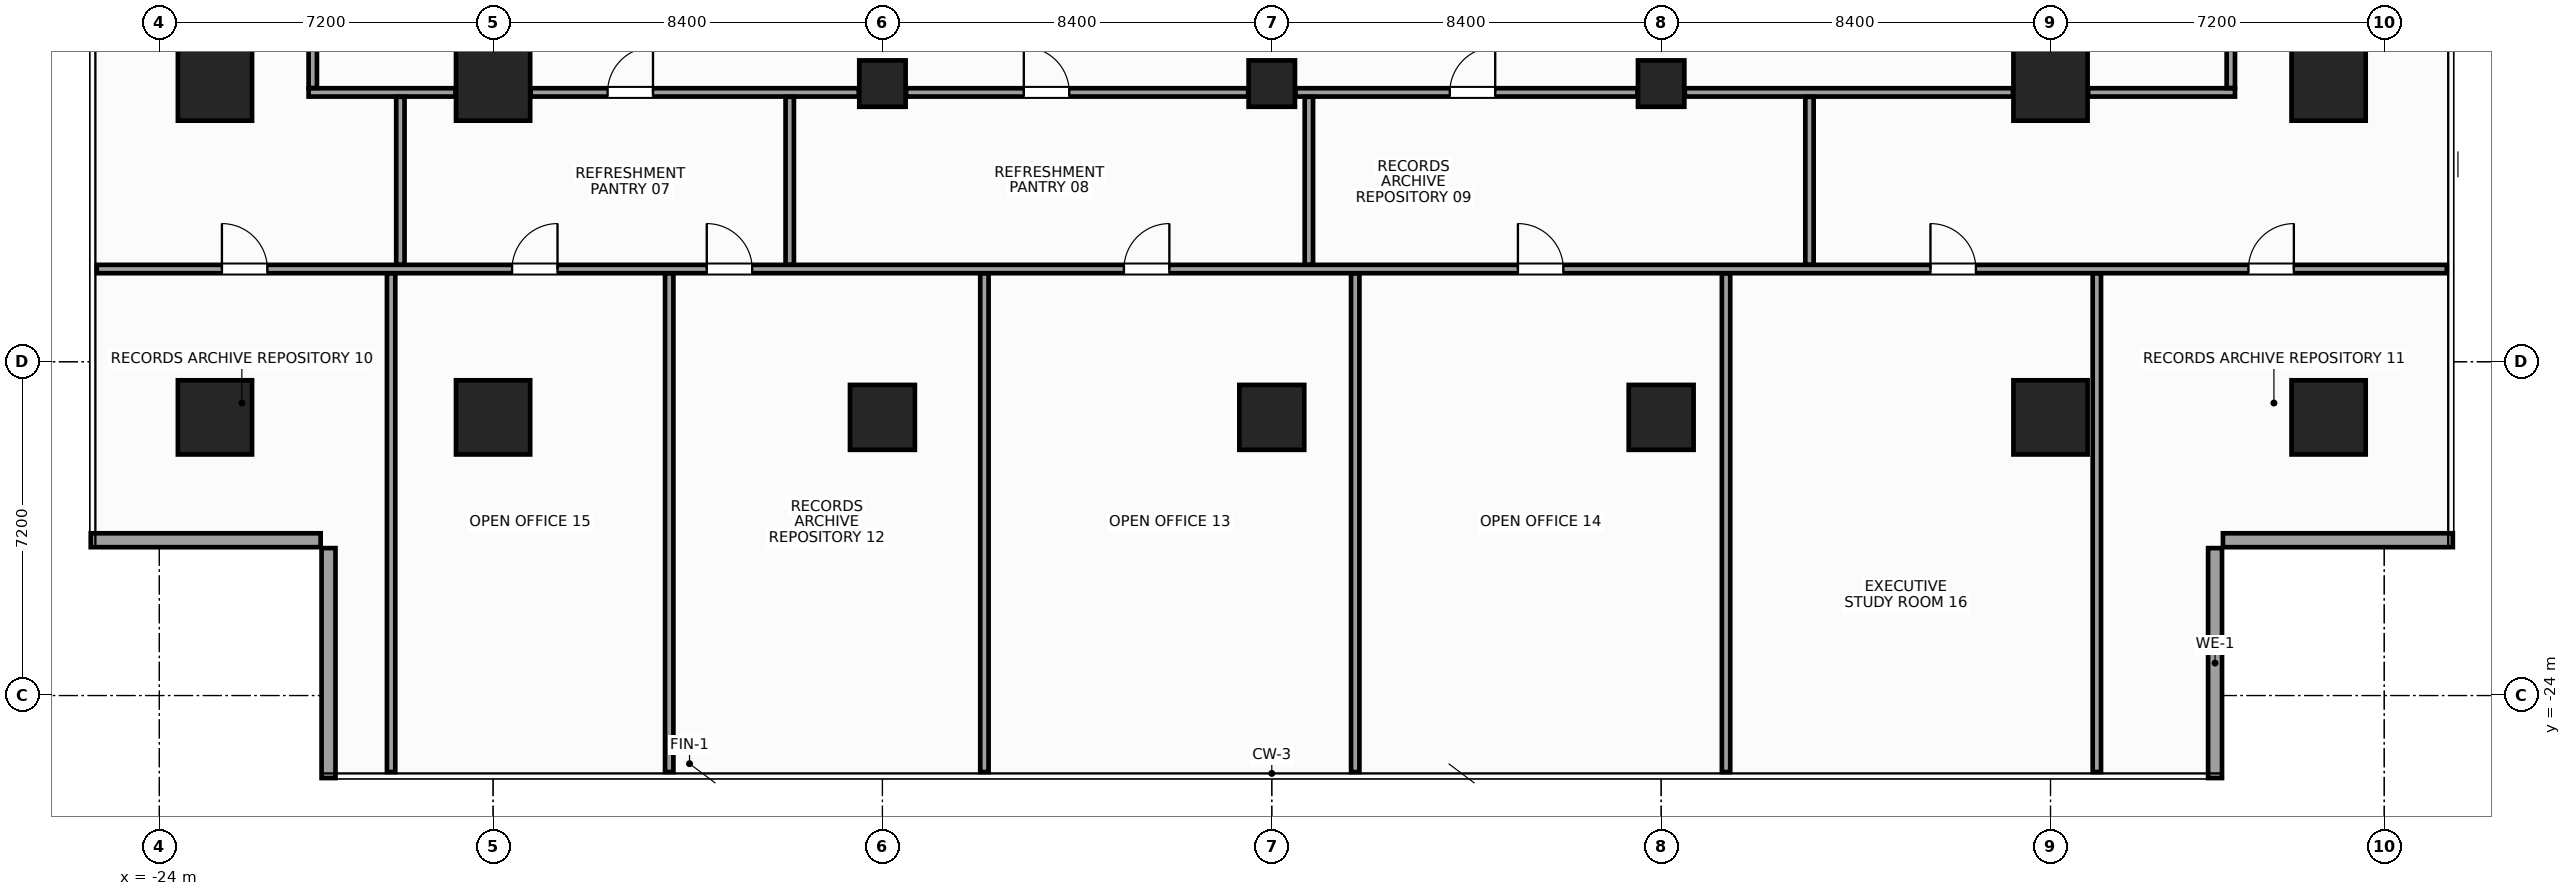
"""IFC4 building model, lengths in metres.
Left out: names, types, materials, properties, quantities, classifications, styles, units other than length and angle.
Written with IfcOpenShell. Run it as: python <this file> out.ifc"""

import sys

from ifc_helpers import new_model, si_unit, direction, frame, frame_2d, origin, origin_2d, place, context, subcontext, project, spatial, rectangle, hollow_rectangle, extrude, source, transform, mapped, element, fill, save


model = new_model("IFC4")
c1 = context("Model", 3, precision=1e-05, world=origin(), true_north=direction((0.0, 1.0)))
c2 = subcontext(c1, "Body", "Model", "MODEL_VIEW")
j1 = project(units=[si_unit("LENGTHUNIT", "METRE"), si_unit("PLANEANGLEUNIT", "RADIAN")], contexts=[c1])
p1 = place(None, origin())
s1 = spatial("IfcSite", under=j1, at=p1, CompositionType="ELEMENT")
p2 = place(p1, origin())
s2 = spatial("IfcBuilding", under=s1, at=p2, CompositionType="ELEMENT")
p3 = place(p2, frame((0.0, 0.0, 113.6)))
s3 = spatial("IfcBuildingStorey", under=s2, at=p3, CompositionType="ELEMENT", Elevation=113.6)
m1 = source(origin(), c2, "Body", "SweptSolid", [
    extrude(rectangle(XDim=1.6, YDim=1.6, at=origin_2d()), origin(), (0.0, 0.0, 1.0), 3.6),
])
for number, where, z_axis, x_axis in (
    (1, (-16.8, -18.0, 0.0), (0.0, 0.0, 1.0), (1.0, 0.0, 0.0)),
    (2, (-16.8, -10.8, 0.0), (0.0, 0.0, 1.0), (1.0, 0.0, 0.0)),
    (3, (16.8, -18.0, 0.0), (0.0, 0.0, 1.0), (1.0, 0.0, 0.0)),
    (4, (16.8, -10.8, 0.0), (0.0, 0.0, 1.0), (1.0, 0.0, 0.0)),
    (5, (-22.8, -18.0, 0.0), (0.0, 0.0, 1.0), (1.0, 0.0, 0.0)),
    (6, (-22.8, -10.8, 0.0), (0.0, 0.0, 1.0), (1.0, 0.0, 0.0)),
    (7, (22.8, -18.0, 0.0), (0.0, 0.0, 1.0), (1.0, 0.0, 0.0)),
    (8, (22.8, -10.8, 0.0), (0.0, 0.0, 1.0), (1.0, 0.0, 0.0)),
):
    element("IfcColumn", number, at=place(p3, frame(where, z_axis=z_axis, x_axis=x_axis)), inside=s3, PredefinedType="COLUMN", context=c2, shape_type="MappedRepresentation", body=[
        mapped(m1, transform((0.0, 0.0, 0.0), x_axis=(1.0, 0.0, 0.0), y_axis=(0.0, 1.0, 0.0), z_axis=(0.0, 0.0, 1.0), scale=1.0)),
    ])
m2 = source(origin(), c2, "Body", "SweptSolid", [
    extrude(rectangle(XDim=1.4, YDim=1.4, at=origin_2d()), origin(), (0.0, 0.0, 1.0), 3.6),
])
p4 = place(p3, frame((-8.4, -18.0, 0.0), z_axis=(0.0, 0.0, 1.0), x_axis=(1.0, 0.0, 0.0)))
e9 = element("IfcColumn", 9, at=p4, inside=s3, PredefinedType="COLUMN", context=c2, shape_type="MappedRepresentation", body=[
    mapped(m2, transform((0.0, 0.0, 0.0), x_axis=(1.0, 0.0, 0.0), y_axis=(0.0, 1.0, 0.0), z_axis=(0.0, 0.0, 1.0), scale=1.0)),
])
m3 = source(origin(), c2, "Body", "SweptSolid", [
    extrude(hollow_rectangle(XDim=1.0, YDim=1.0, WallThickness=0.045, at=origin_2d()), origin(), (0.0, 0.0, 1.0), 3.6),
])
p5 = place(p3, frame((-8.4, -10.8, 0.0), z_axis=(0.0, 0.0, 1.0), x_axis=(1.0, 0.0, 0.0)))
e10 = element("IfcColumn", 10, at=p5, inside=s3, PredefinedType="COLUMN", context=c2, shape_type="MappedRepresentation", body=[
    mapped(m3, transform((0.0, 0.0, 0.0), x_axis=(1.0, 0.0, 0.0), y_axis=(0.0, 1.0, 0.0), z_axis=(0.0, 0.0, 1.0), scale=1.0)),
])
p6 = place(p3, frame((8.4, -18.0, 0.0), z_axis=(0.0, 0.0, 1.0), x_axis=(1.0, 0.0, 0.0)))
e11 = element("IfcColumn", 11, at=p6, inside=s3, PredefinedType="COLUMN", context=c2, shape_type="MappedRepresentation", body=[
    mapped(m2, transform((0.0, 0.0, 0.0), x_axis=(1.0, 0.0, 0.0), y_axis=(0.0, 1.0, 0.0), z_axis=(0.0, 0.0, 1.0), scale=1.0)),
])
p7 = place(p3, frame((8.4, -10.8, 0.0), z_axis=(0.0, 0.0, 1.0), x_axis=(1.0, 0.0, 0.0)))
e12 = element("IfcColumn", 12, at=p7, inside=s3, PredefinedType="COLUMN", context=c2, shape_type="MappedRepresentation", body=[
    mapped(m3, transform((0.0, 0.0, 0.0), x_axis=(1.0, 0.0, 0.0), y_axis=(0.0, 1.0, 0.0), z_axis=(0.0, 0.0, 1.0), scale=1.0)),
])
p8 = place(p3, frame((0.0, -18.0, 0.0), z_axis=(0.0, 0.0, 1.0), x_axis=(1.0, 0.0, 0.0)))
e13 = element("IfcColumn", 13, at=p8, inside=s3, PredefinedType="COLUMN", context=c2, shape_type="MappedRepresentation", body=[
    mapped(m2, transform((0.0, 0.0, 0.0), x_axis=(1.0, 0.0, 0.0), y_axis=(0.0, 1.0, 0.0), z_axis=(0.0, 0.0, 1.0), scale=1.0)),
])
m4 = source(origin(), c2, "Body", "SweptSolid", [
    extrude(rectangle(XDim=1.0, YDim=1.0, at=origin_2d()), origin(), (0.0, 0.0, 1.0), 3.6),
])
p9 = place(p3, frame((0.0, -10.8, 0.0), z_axis=(0.0, 0.0, 1.0), x_axis=(1.0, 0.0, 0.0)))
e14 = element("IfcColumn", 14, at=p9, inside=s3, PredefinedType="COLUMN", context=c2, shape_type="MappedRepresentation", body=[
    mapped(m4, transform((0.0, 0.0, 0.0), x_axis=(1.0, 0.0, 0.0), y_axis=(0.0, 1.0, 0.0), z_axis=(0.0, 0.0, 1.0), scale=1.0)),
])
m5 = source(origin(), c2, "Body", "SweptSolid", [
    extrude(rectangle(XDim=4.96, YDim=0.3, at=frame_2d((2.48, 0.0))), origin(), (0.0, 0.0, 1.0), 2.74),
])
for number, where, z_axis, x_axis in (
    (15, (20.35, -25.78, 0.0), (0.0, 0.0, 1.0), (0.0, 1.0, 0.0)),
    (16, (20.52, -20.65, 0.0), (0.0, 0.0, 1.0), (1.0, 0.0, 0.0)),
    (17, (-25.48, -20.65, 0.0), (0.0, 0.0, 1.0), (1.0, 0.0, 0.0)),
    (18, (-20.35, -20.82, 0.0), (0.0, 0.0, 1.0), (0.0, -1.0, 0.0)),
):
    element("IfcWall", number, at=place(p3, frame(where, z_axis=z_axis, x_axis=x_axis)), inside=s3, PredefinedType="STANDARD", context=c2, shape_type="MappedRepresentation", body=[
        mapped(m5, transform((0.0, 0.0, 0.0), x_axis=(1.0, 0.0, 0.0), y_axis=(0.0, 1.0, 0.0), z_axis=(0.0, 0.0, 1.0), scale=1.0)),
    ])
m6 = source(origin(), c2, "Body", "SweptSolid", [
    extrude(rectangle(XDim=3.17, YDim=0.18, at=frame_2d((1.585, 0.0))), origin(), (0.0, 0.0, 1.0), 2.745),
])
p10 = place(p3, frame((-20.78, -10.99, 0.0), z_axis=(0.0, 0.0, 1.0), x_axis=(1.0, 0.0, 0.0)))
e19 = element("IfcWall", 19, at=p10, inside=s3, PredefinedType="PARTITIONING", context=c2, shape_type="MappedRepresentation", body=[
    mapped(m6, transform((0.0, 0.0, 0.0), x_axis=(1.0, 0.0, 0.0), y_axis=(0.0, 1.0, 0.0), z_axis=(0.0, 0.0, 1.0), scale=1.0)),
])
m7 = source(origin(), c2, "Body", "SweptSolid", [
    extrude(rectangle(XDim=7.08, YDim=0.18, at=frame_2d((3.54, 0.0))), origin(), (0.0, 0.0, 1.0), 2.745),
])
p11 = place(p3, frame((-15.99, -10.99, 0.0), z_axis=(0.0, 0.0, 1.0), x_axis=(1.0, 0.0, 0.0)))
e20 = element("IfcWall", 20, at=p11, inside=s3, PredefinedType="PARTITIONING", context=c2, shape_type="MappedRepresentation", body=[
    mapped(m7, transform((0.0, 0.0, 0.0), x_axis=(1.0, 0.0, 0.0), y_axis=(0.0, 1.0, 0.0), z_axis=(0.0, 0.0, 1.0), scale=1.0)),
])
p12 = place(p11, frame((1.66, 0.0, 0.0)))
e21 = element("IfcOpeningElement", 21, at=p12, cuts=e20, PredefinedType="OPENING", context=c2, shape_type="SweptSolid", body=[
    extrude(rectangle(XDim=0.98, YDim=2.15, at=frame_2d((0.49, 1.075))), frame((0.0, 0.102, 0.0), z_axis=(0.0, -1.0, 0.0), x_axis=(1.0, 0.0, 0.0)), (0.0, 0.0, 1.0), 0.204),
])
m8 = source(origin(), c2, "Body", "SweptSolid", [
    extrude(rectangle(XDim=7.38, YDim=0.18, at=frame_2d((3.69, 0.0))), origin(), (0.0, 0.0, 1.0), 2.745),
])
p13 = place(p3, frame((-7.89, -10.99, 0.0), z_axis=(0.0, 0.0, 1.0), x_axis=(1.0, 0.0, 0.0)))
e22 = element("IfcWall", 22, at=p13, inside=s3, PredefinedType="PARTITIONING", context=c2, shape_type="MappedRepresentation", body=[
    mapped(m8, transform((0.0, 0.0, 0.0), x_axis=(1.0, 0.0, 0.0), y_axis=(0.0, 1.0, 0.0), z_axis=(0.0, 0.0, 1.0), scale=1.0)),
])
p14 = place(p13, frame((2.54, 0.0, 0.0)))
e23 = element("IfcOpeningElement", 23, at=p14, cuts=e22, PredefinedType="OPENING", context=c2, shape_type="SweptSolid", body=[
    extrude(rectangle(XDim=0.98, YDim=2.15, at=frame_2d((0.49, 1.075))), frame((0.0, 0.102, 0.0), z_axis=(0.0, -1.0, 0.0), x_axis=(1.0, 0.0, 0.0)), (0.0, 0.0, 1.0), 0.204),
])
p15 = place(p3, frame((0.51, -10.99, 0.0), z_axis=(0.0, 0.0, 1.0), x_axis=(1.0, 0.0, 0.0)))
e24 = element("IfcWall", 24, at=p15, inside=s3, PredefinedType="PARTITIONING", context=c2, shape_type="MappedRepresentation", body=[
    mapped(m8, transform((0.0, 0.0, 0.0), x_axis=(1.0, 0.0, 0.0), y_axis=(0.0, 1.0, 0.0), z_axis=(0.0, 0.0, 1.0), scale=1.0)),
])
p16 = place(p15, frame((3.33, 0.0, 0.0)))
e25 = element("IfcOpeningElement", 25, at=p16, cuts=e24, PredefinedType="OPENING", context=c2, shape_type="SweptSolid", body=[
    extrude(rectangle(XDim=0.98, YDim=2.15, at=frame_2d((0.49, 1.075))), frame((0.0, 0.102, 0.0), z_axis=(0.0, -1.0, 0.0), x_axis=(1.0, 0.0, 0.0)), (0.0, 0.0, 1.0), 0.204),
])
p17 = place(p3, frame((8.91, -10.99, 0.0), z_axis=(0.0, 0.0, 1.0), x_axis=(1.0, 0.0, 0.0)))
e26 = element("IfcWall", 26, at=p17, inside=s3, PredefinedType="PARTITIONING", context=c2, shape_type="MappedRepresentation", body=[
    mapped(m7, transform((0.0, 0.0, 0.0), x_axis=(1.0, 0.0, 0.0), y_axis=(0.0, 1.0, 0.0), z_axis=(0.0, 0.0, 1.0), scale=1.0)),
])
p18 = place(p3, frame((17.61, -10.99, 0.0), z_axis=(0.0, 0.0, 1.0), x_axis=(1.0, 0.0, 0.0)))
e27 = element("IfcWall", 27, at=p18, inside=s3, PredefinedType="PARTITIONING", context=c2, shape_type="MappedRepresentation", body=[
    mapped(m6, transform((0.0, 0.0, 0.0), x_axis=(1.0, 0.0, 0.0), y_axis=(0.0, 1.0, 0.0), z_axis=(0.0, 0.0, 1.0), scale=1.0)),
])
m9 = source(origin(), c2, "Body", "SweptSolid", [
    extrude(rectangle(XDim=2.09, YDim=0.18, at=frame_2d((1.045, 0.0))), origin(), (0.0, 0.0, 1.0), 3.36),
])
for number, where, z_axis, x_axis in (
    (28, (-20.69, -10.895, 0.0), (0.0, 0.0, 1.0), (0.0, 1.0, 0.0)),
    (29, (20.69, -10.895, 0.0), (0.0, 0.0, 1.0), (0.0, 1.0, 0.0)),
):
    element("IfcWall", number, at=place(p3, frame(where, z_axis=z_axis, x_axis=x_axis)), inside=s3, PredefinedType="PARTITIONING", context=c2, shape_type="MappedRepresentation", body=[
        mapped(m9, transform((0.0, 0.0, 0.0), x_axis=(1.0, 0.0, 0.0), y_axis=(0.0, 1.0, 0.0), z_axis=(0.0, 0.0, 1.0), scale=1.0)),
    ])
m10 = source(origin(), c2, "Body", "SweptSolid", [
    extrude(rectangle(XDim=50.7, YDim=0.18, at=frame_2d((25.35, 0.0))), origin(), (0.0, 0.0, 1.0), 2.945),
])
p19 = place(p3, frame((-25.35, -14.8, 0.0), z_axis=(0.0, 0.0, 1.0), x_axis=(1.0, 0.0, 0.0)))
e30 = element("IfcWall", 30, at=p19, inside=s3, PredefinedType="PARTITIONING", context=c2, shape_type="MappedRepresentation", body=[
    mapped(m10, transform((0.0, 0.0, 0.0), x_axis=(1.0, 0.0, 0.0), y_axis=(0.0, 1.0, 0.0), z_axis=(0.0, 0.0, 1.0), scale=1.0)),
])
p20 = place(p19, frame((2.7, 0.0, 0.0)))
e31 = element("IfcOpeningElement", 31, at=p20, cuts=e30, PredefinedType="OPENING", context=c2, shape_type="SweptSolid", body=[
    extrude(rectangle(XDim=0.98, YDim=2.15, at=frame_2d((0.49, 1.075))), frame((0.0, 0.102, 0.0), z_axis=(0.0, -1.0, 0.0), x_axis=(1.0, 0.0, 0.0)), (0.0, 0.0, 1.0), 0.204),
])
p21 = place(p19, frame((46.42, 0.0, 0.0)))
e32 = element("IfcOpeningElement", 32, at=p21, cuts=e30, PredefinedType="OPENING", context=c2, shape_type="SweptSolid", body=[
    extrude(rectangle(XDim=0.98, YDim=2.15, at=frame_2d((0.49, 1.075))), frame((0.0, 0.102, 0.0), z_axis=(0.0, -1.0, 0.0), x_axis=(1.0, 0.0, 0.0)), (0.0, 0.0, 1.0), 0.204),
])
p22 = place(p19, frame((13.16, 0.0, 0.0)))
e33 = element("IfcOpeningElement", 33, at=p22, cuts=e30, PredefinedType="OPENING", context=c2, shape_type="SweptSolid", body=[
    extrude(rectangle(XDim=0.98, YDim=2.15, at=frame_2d((0.49, 1.075))), frame((0.0, 0.102, 0.0), z_axis=(0.0, -1.0, 0.0), x_axis=(1.0, 0.0, 0.0)), (0.0, 0.0, 1.0), 0.204),
])
p23 = place(p19, frame((22.16, 0.0, 0.0)))
e34 = element("IfcOpeningElement", 34, at=p23, cuts=e30, PredefinedType="OPENING", context=c2, shape_type="SweptSolid", body=[
    extrude(rectangle(XDim=0.98, YDim=2.15, at=frame_2d((0.49, 1.075))), frame((0.0, 0.102, 0.0), z_axis=(0.0, -1.0, 0.0), x_axis=(1.0, 0.0, 0.0)), (0.0, 0.0, 1.0), 0.204),
])
p24 = place(p19, frame((30.66, 0.0, 0.0)))
e35 = element("IfcOpeningElement", 35, at=p24, cuts=e30, PredefinedType="OPENING", context=c2, shape_type="SweptSolid", body=[
    extrude(rectangle(XDim=0.98, YDim=2.15, at=frame_2d((0.49, 1.075))), frame((0.0, 0.102, 0.0), z_axis=(0.0, -1.0, 0.0), x_axis=(1.0, 0.0, 0.0)), (0.0, 0.0, 1.0), 0.204),
])
p25 = place(p19, frame((8.96, 0.0, 0.0)))
e36 = element("IfcOpeningElement", 36, at=p25, cuts=e30, PredefinedType="OPENING", context=c2, shape_type="SweptSolid", body=[
    extrude(rectangle(XDim=0.98, YDim=2.15, at=frame_2d((0.49, 1.075))), frame((0.0, 0.102, 0.0), z_axis=(0.0, -1.0, 0.0), x_axis=(1.0, 0.0, 0.0)), (0.0, 0.0, 1.0), 0.204),
])
p26 = place(p19, frame((39.56, 0.0, 0.0)))
e37 = element("IfcOpeningElement", 37, at=p26, cuts=e30, PredefinedType="OPENING", context=c2, shape_type="SweptSolid", body=[
    extrude(rectangle(XDim=0.98, YDim=2.15, at=frame_2d((0.49, 1.075))), frame((0.0, 0.102, 0.0), z_axis=(0.0, -1.0, 0.0), x_axis=(1.0, 0.0, 0.0)), (0.0, 0.0, 1.0), 0.204),
])
m11 = source(origin(), c2, "Body", "SweptSolid", [
    extrude(rectangle(XDim=3.62, YDim=0.18, at=frame_2d((1.81, 0.0))), origin(), (0.0, 0.0, 1.0), 3.36),
])
for number, where, z_axis, x_axis in (
    (38, (-18.8, -14.705, 0.0), (0.0, 0.0, 1.0), (0.0, 1.0, 0.0)),
    (39, (-10.4, -14.705, 0.0), (0.0, 0.0, 1.0), (0.0, 1.0, 0.0)),
    (40, (0.8, -14.705, 0.0), (0.0, 0.0, 1.0), (0.0, 1.0, 0.0)),
    (41, (11.6, -14.705, 0.0), (0.0, 0.0, 1.0), (0.0, 1.0, 0.0)),
):
    element("IfcWall", number, at=place(p3, frame(where, z_axis=z_axis, x_axis=x_axis)), inside=s3, PredefinedType="PARTITIONING", context=c2, shape_type="MappedRepresentation", body=[
        mapped(m11, transform((0.0, 0.0, 0.0), x_axis=(1.0, 0.0, 0.0), y_axis=(0.0, 1.0, 0.0), z_axis=(0.0, 0.0, 1.0), scale=1.0)),
    ])
m12 = source(origin(), c2, "Body", "SweptSolid", [
    extrude(rectangle(XDim=10.755, YDim=0.18, at=frame_2d((5.377, 0.0))), origin(), (0.0, 0.0, 1.0), 2.745),
])
for number, where, z_axis, x_axis in (
    (42, (-19.0, -25.65, 0.0), (0.0, 0.0, 1.0), (0.0, 1.0, 0.0)),
    (43, (-13.0, -25.65, 0.0), (0.0, 0.0, 1.0), (0.0, 1.0, 0.0)),
    (44, (-6.2, -25.65, 0.0), (0.0, 0.0, 1.0), (0.0, 1.0, 0.0)),
    (45, (1.8, -25.65, 0.0), (0.0, 0.0, 1.0), (0.0, 1.0, 0.0)),
    (46, (9.8, -25.65, 0.0), (0.0, 0.0, 1.0), (0.0, 1.0, 0.0)),
    (47, (17.8, -25.65, 0.0), (0.0, 0.0, 1.0), (0.0, 1.0, 0.0)),
):
    element("IfcWall", number, at=place(p3, frame(where, z_axis=z_axis, x_axis=x_axis)), inside=s3, PredefinedType="PARTITIONING", context=c2, shape_type="MappedRepresentation", body=[
        mapped(m12, transform((0.0, 0.0, 0.0), x_axis=(1.0, 0.0, 0.0), y_axis=(0.0, 1.0, 0.0), z_axis=(0.0, 0.0, 1.0), scale=1.0)),
    ])
m13 = source(origin(), c2, "Body", "SweptSolid", [
    extrude(rectangle(XDim=0.98, YDim=2.15, at=frame_2d((0.49, 1.075))), frame((0.0, 0.025, 0.0), z_axis=(0.0, -1.0, 0.0), x_axis=(1.0, 0.0, 0.0)), (0.0, 0.0, 1.0), 0.05),
])
p27 = place(p12, origin())
e48 = element("IfcDoor", 48, at=p27, inside=s3, OperationType="SINGLE_SWING_RIGHT", PredefinedType="DOOR", context=c2, shape_type="MappedRepresentation", body=[
    mapped(m13, transform((0.0, 0.0, 0.0), x_axis=(1.0, 0.0, 0.0), y_axis=(0.0, 1.0, 0.0), z_axis=(0.0, 0.0, 1.0), scale=1.0)),
])
fill(e21, e48)
p28 = place(p14, origin())
e49 = element("IfcDoor", 49, at=p28, inside=s3, OperationType="SINGLE_SWING_LEFT", PredefinedType="DOOR", context=c2, shape_type="MappedRepresentation", body=[
    mapped(m13, transform((0.0, 0.0, 0.0), x_axis=(1.0, 0.0, 0.0), y_axis=(0.0, 1.0, 0.0), z_axis=(0.0, 0.0, 1.0), scale=1.0)),
])
fill(e23, e49)
p29 = place(p16, origin())
e50 = element("IfcDoor", 50, at=p29, inside=s3, OperationType="SINGLE_SWING_RIGHT", PredefinedType="DOOR", context=c2, shape_type="MappedRepresentation", body=[
    mapped(m13, transform((0.0, 0.0, 0.0), x_axis=(1.0, 0.0, 0.0), y_axis=(0.0, 1.0, 0.0), z_axis=(0.0, 0.0, 1.0), scale=1.0)),
])
fill(e25, e50)
p30 = place(p20, origin())
e51 = element("IfcDoor", 51, at=p30, inside=s3, OperationType="SINGLE_SWING_LEFT", PredefinedType="DOOR", context=c2, shape_type="MappedRepresentation", body=[
    mapped(m13, transform((0.0, 0.0, 0.0), x_axis=(1.0, 0.0, 0.0), y_axis=(0.0, 1.0, 0.0), z_axis=(0.0, 0.0, 1.0), scale=1.0)),
])
fill(e31, e51)
p31 = place(p21, origin())
e52 = element("IfcDoor", 52, at=p31, inside=s3, OperationType="SINGLE_SWING_RIGHT", PredefinedType="DOOR", context=c2, shape_type="MappedRepresentation", body=[
    mapped(m13, transform((0.0, 0.0, 0.0), x_axis=(1.0, 0.0, 0.0), y_axis=(0.0, 1.0, 0.0), z_axis=(0.0, 0.0, 1.0), scale=1.0)),
])
fill(e32, e52)
p32 = place(p22, origin())
e53 = element("IfcDoor", 53, at=p32, inside=s3, OperationType="SINGLE_SWING_LEFT", PredefinedType="DOOR", context=c2, shape_type="MappedRepresentation", body=[
    mapped(m13, transform((0.0, 0.0, 0.0), x_axis=(1.0, 0.0, 0.0), y_axis=(0.0, 1.0, 0.0), z_axis=(0.0, 0.0, 1.0), scale=1.0)),
])
fill(e33, e53)
p33 = place(p23, origin())
e54 = element("IfcDoor", 54, at=p33, inside=s3, OperationType="SINGLE_SWING_RIGHT", PredefinedType="DOOR", context=c2, shape_type="MappedRepresentation", body=[
    mapped(m13, transform((0.0, 0.0, 0.0), x_axis=(1.0, 0.0, 0.0), y_axis=(0.0, 1.0, 0.0), z_axis=(0.0, 0.0, 1.0), scale=1.0)),
])
fill(e34, e54)
p34 = place(p24, origin())
e55 = element("IfcDoor", 55, at=p34, inside=s3, OperationType="SINGLE_SWING_LEFT", PredefinedType="DOOR", context=c2, shape_type="MappedRepresentation", body=[
    mapped(m13, transform((0.0, 0.0, 0.0), x_axis=(1.0, 0.0, 0.0), y_axis=(0.0, 1.0, 0.0), z_axis=(0.0, 0.0, 1.0), scale=1.0)),
])
fill(e35, e55)
p35 = place(p25, origin())
e56 = element("IfcDoor", 56, at=p35, inside=s3, OperationType="SINGLE_SWING_RIGHT", PredefinedType="DOOR", context=c2, shape_type="MappedRepresentation", body=[
    mapped(m13, transform((0.0, 0.0, 0.0), x_axis=(1.0, 0.0, 0.0), y_axis=(0.0, 1.0, 0.0), z_axis=(0.0, 0.0, 1.0), scale=1.0)),
])
fill(e36, e56)
p36 = place(p26, origin())
e57 = element("IfcDoor", 57, at=p36, inside=s3, OperationType="SINGLE_SWING_LEFT", PredefinedType="DOOR", context=c2, shape_type="MappedRepresentation", body=[
    mapped(m13, transform((0.0, 0.0, 0.0), x_axis=(1.0, 0.0, 0.0), y_axis=(0.0, 1.0, 0.0), z_axis=(0.0, 0.0, 1.0), scale=1.0)),
])
fill(e37, e57)
save(model, sys.argv[1])
